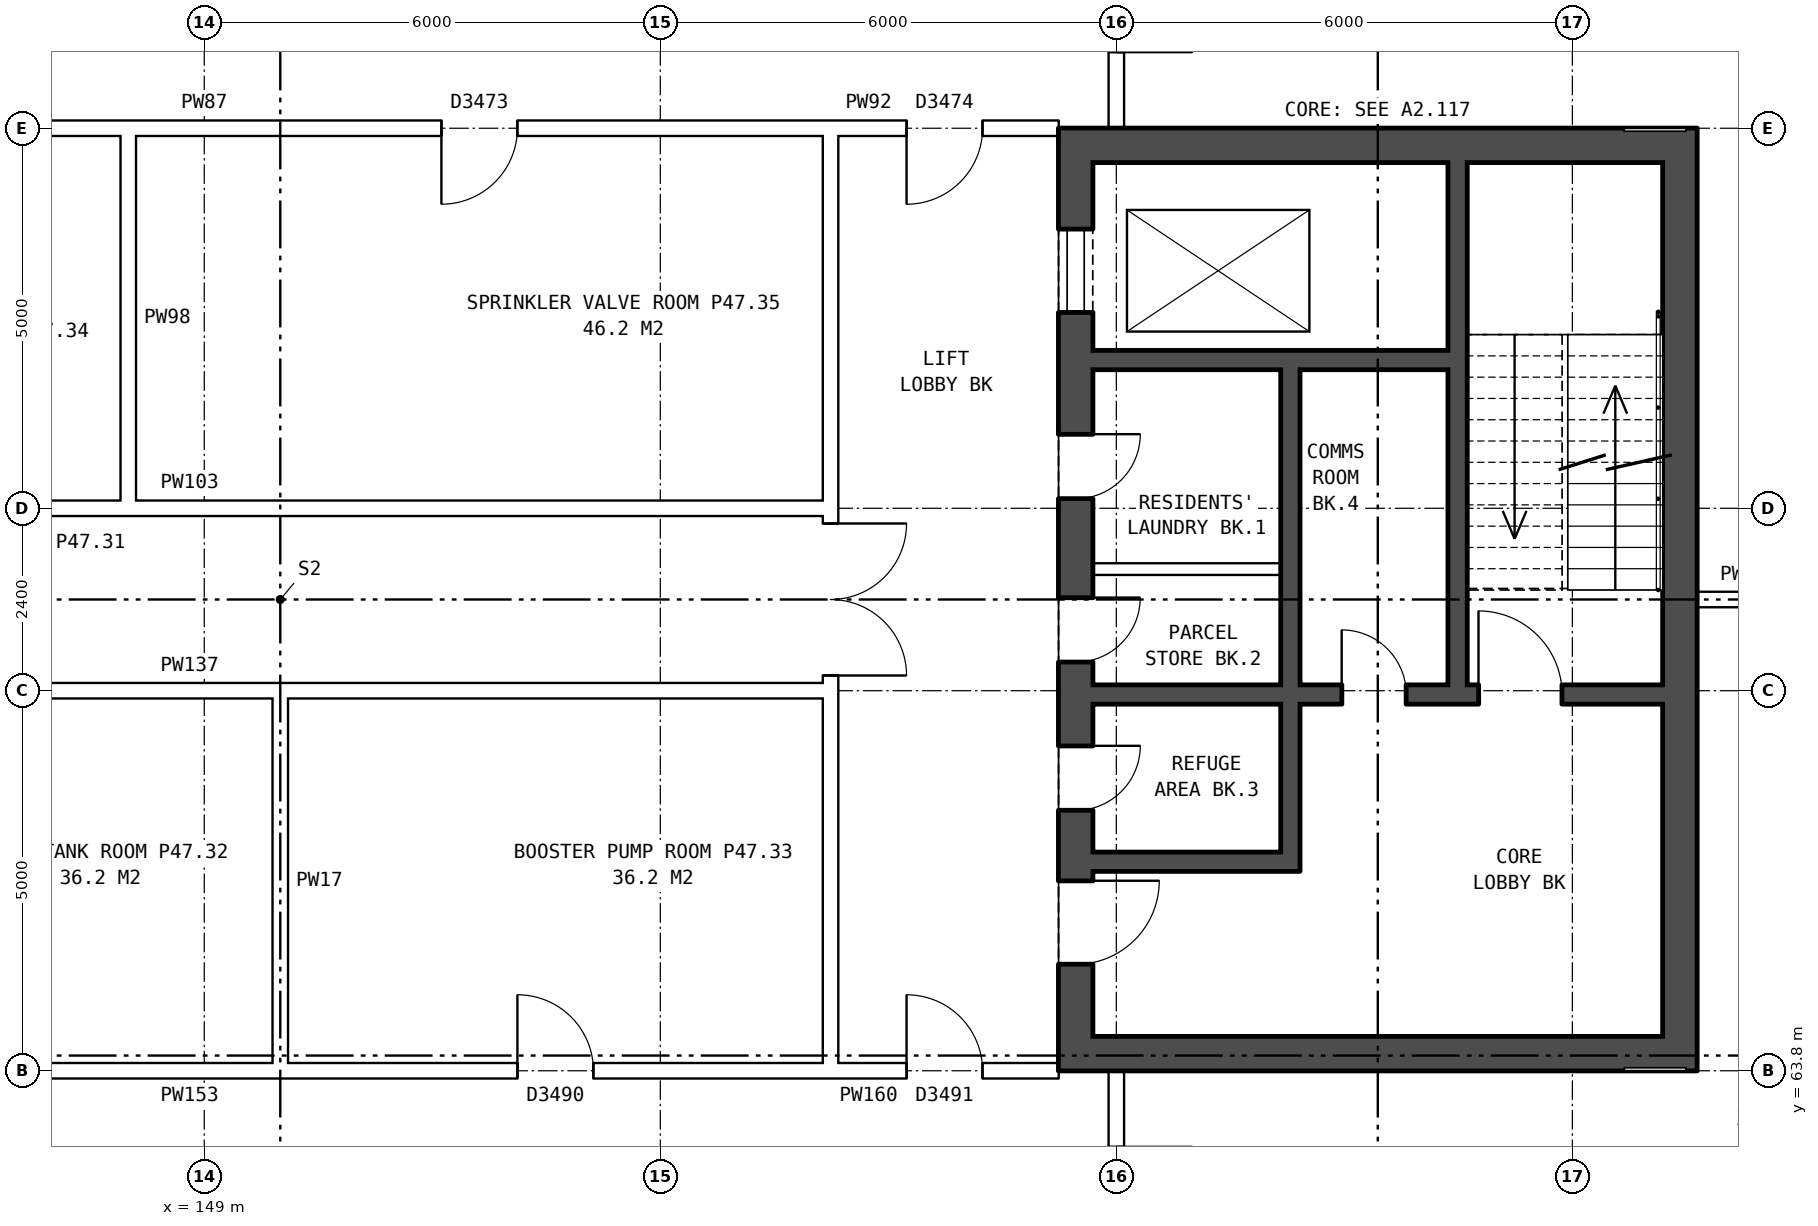
"""IFC4 building model, lengths in metres.
Left out: names, types, materials, properties, quantities, classifications, styles, units other than length and angle.
Written with IfcOpenShell. Run it as: python <this file> out.ifc"""

import sys

from ifc_helpers import new_model, si_unit, direction, frame, frame_2d, origin, place, context, subcontext, project, spatial, rectangle, extrude, element, fill, save


model = new_model("IFC4")
c1 = context("Model", 3, precision=1e-05, world=origin(), true_north=direction((0.0, 1.0)))
c2 = subcontext(c1, "Body", "Model", "MODEL_VIEW")
j1 = project(units=[si_unit("LENGTHUNIT", "METRE"), si_unit("PLANEANGLEUNIT", "RADIAN")], contexts=[c1])
p1 = place(None, origin())
s1 = spatial("IfcSite", under=j1, at=p1, CompositionType="ELEMENT")
p2 = place(p1, origin())
s2 = spatial("IfcBuilding", under=s1, at=p2, CompositionType="ELEMENT")
p3 = place(p2, frame((0.0, 0.0, 167.1)))
s3 = spatial("IfcBuildingStorey", under=s2, at=p3, CompositionType="ELEMENT", Elevation=167.1)
p4 = place(p3, frame((160.465, 76.2, 0.0), z_axis=(0.0, 0.0, 1.0), x_axis=(0.0, -1.0, 0.0)))
e1 = element("IfcWall", 1, at=p4, inside=s3, PredefinedType="SHEAR", context=c2, shape_type="SweptSolid", body=[
    extrude(rectangle(XDim=12.4, YDim=0.45, at=frame_2d((6.2, 0.0))), origin(), (0.0, 0.0, 1.0), 4.2),
])
p5 = place(p4, frame((1.325, 0.0, 0.0)))
e2 = element("IfcOpeningElement", 2, at=p5, cuts=e1, PredefinedType="OPENING", context=c2, shape_type="SweptSolid", body=[
    extrude(rectangle(XDim=1.1, YDim=2.1, at=frame_2d((0.55, 1.05))), frame((0.0, 0.235, 0.0), z_axis=(0.0, -1.0, 0.0), x_axis=(1.0, 0.0, 0.0)), (0.0, 0.0, 1.0), 0.47),
])
p6 = place(p4, frame((4.025, 0.0, 0.0)))
e3 = element("IfcOpeningElement", 3, at=p6, cuts=e1, PredefinedType="OPENING", context=c2, shape_type="SweptSolid", body=[
    extrude(rectangle(XDim=0.85, YDim=2.1, at=frame_2d((0.425, 1.05))), frame((0.0, 0.235, 0.0), z_axis=(0.0, -1.0, 0.0), x_axis=(1.0, 0.0, 0.0)), (0.0, 0.0, 1.0), 0.47),
])
p7 = place(p4, frame((6.175, 0.0, 0.0)))
e4 = element("IfcOpeningElement", 4, at=p7, cuts=e1, PredefinedType="OPENING", context=c2, shape_type="SweptSolid", body=[
    extrude(rectangle(XDim=0.85, YDim=2.1, at=frame_2d((0.425, 1.05))), frame((0.0, 0.235, 0.0), z_axis=(0.0, -1.0, 0.0), x_axis=(1.0, 0.0, 0.0)), (0.0, 0.0, 1.0), 0.47),
])
p8 = place(p4, frame((9.9, 0.0, 0.0)))
e5 = element("IfcOpeningElement", 5, at=p8, cuts=e1, PredefinedType="OPENING", context=c2, shape_type="SweptSolid", body=[
    extrude(rectangle(XDim=1.1, YDim=2.1, at=frame_2d((0.55, 1.05))), frame((0.0, 0.235, 0.0), z_axis=(0.0, -1.0, 0.0), x_axis=(1.0, 0.0, 0.0)), (0.0, 0.0, 1.0), 0.47),
])
p9 = place(p4, frame((8.125, 0.0, 0.0)))
e6 = element("IfcOpeningElement", 6, at=p9, cuts=e1, PredefinedType="OPENING", context=c2, shape_type="SweptSolid", body=[
    extrude(rectangle(XDim=0.85, YDim=2.1, at=frame_2d((0.425, 1.05))), frame((0.0, 0.235, 0.0), z_axis=(0.0, -1.0, 0.0), x_axis=(1.0, 0.0, 0.0)), (0.0, 0.0, 1.0), 0.47),
])
p10 = place(p3, frame((168.415, 76.2, 0.0), z_axis=(0.0, 0.0, 1.0), x_axis=(0.0, -1.0, 0.0)))
e7 = element("IfcWall", 7, at=p10, inside=s3, PredefinedType="SHEAR", context=c2, shape_type="SweptSolid", body=[
    extrude(rectangle(XDim=12.4, YDim=0.45, at=frame_2d((6.2, 0.0))), origin(), (0.0, 0.0, 1.0), 4.2),
])
for number, where, z_axis, x_axis in (
    (8, (160.69, 75.975, 0.0), (0.0, 0.0, 1.0), (1.0, 0.0, 0.0)),
    (9, (160.69, 64.025, 0.0), (0.0, 0.0, 1.0), (1.0, 0.0, 0.0)),
):
    element("IfcWall", number, at=place(p3, frame(where, z_axis=z_axis, x_axis=x_axis)), inside=s3, PredefinedType="SHEAR", context=c2, shape_type="SweptSolid", body=[
        extrude(rectangle(XDim=7.5, YDim=0.45, at=frame_2d((3.75, 0.0))), origin(), (0.0, 0.0, 1.0), 4.2),
    ])
p11 = place(p3, frame((160.69, 73.15, 0.0), z_axis=(0.0, 0.0, 1.0), x_axis=(1.0, 0.0, 0.0)))
e10 = element("IfcWall", 10, at=p11, inside=s3, PredefinedType="SHEAR", context=c2, shape_type="SweptSolid", body=[
    extrude(rectangle(XDim=4.675, YDim=0.25, at=frame_2d((2.337, 0.0))), origin(), (0.0, 0.0, 1.0), 4.2),
])
p12 = place(p3, frame((160.69, 70.4, 0.0), z_axis=(0.0, 0.0, 1.0), x_axis=(1.0, 0.0, 0.0)))
e11 = element("IfcWall", 11, at=p12, inside=s3, PredefinedType="PARTITIONING", context=c2, shape_type="SweptSolid", body=[
    extrude(rectangle(XDim=2.475, YDim=0.15, at=frame_2d((1.238, 0.0))), origin(), (0.0, 0.0, 1.0), 4.2),
])
p13 = place(p3, frame((160.69, 68.75, 0.0), z_axis=(0.0, 0.0, 1.0), x_axis=(1.0, 0.0, 0.0)))
e12 = element("IfcWall", 12, at=p13, inside=s3, PredefinedType="SHEAR", context=c2, shape_type="SweptSolid", body=[
    extrude(rectangle(XDim=7.5, YDim=0.25, at=frame_2d((3.75, 0.0))), origin(), (0.0, 0.0, 1.0), 4.2),
])
p14 = place(p13, frame((5.075, 0.0, 0.0)))
e13 = element("IfcOpeningElement", 13, at=p14, cuts=e12, PredefinedType="OPENING", context=c2, shape_type="SweptSolid", body=[
    extrude(rectangle(XDim=1.1, YDim=2.1, at=frame_2d((0.55, 1.05))), frame((0.0, 0.135, 0.0), z_axis=(0.0, -1.0, 0.0), x_axis=(1.0, 0.0, 0.0)), (0.0, 0.0, 1.0), 0.27),
])
p15 = place(p13, frame((3.275, 0.0, 0.0)))
e14 = element("IfcOpeningElement", 14, at=p15, cuts=e12, PredefinedType="OPENING", context=c2, shape_type="SweptSolid", body=[
    extrude(rectangle(XDim=0.85, YDim=2.1, at=frame_2d((0.425, 1.05))), frame((0.0, 0.135, 0.0), z_axis=(0.0, -1.0, 0.0), x_axis=(1.0, 0.0, 0.0)), (0.0, 0.0, 1.0), 0.27),
])
p16 = place(p3, frame((160.69, 66.55, 0.0), z_axis=(0.0, 0.0, 1.0), x_axis=(1.0, 0.0, 0.0)))
e15 = element("IfcWall", 15, at=p16, inside=s3, PredefinedType="SHEAR", context=c2, shape_type="SweptSolid", body=[
    extrude(rectangle(XDim=2.475, YDim=0.25, at=frame_2d((1.238, 0.0))), origin(), (0.0, 0.0, 1.0), 4.2),
])
p17 = place(p3, frame((163.29, 73.025, 0.0), z_axis=(0.0, 0.0, 1.0), x_axis=(0.0, -1.0, 0.0)))
e16 = element("IfcWall", 16, at=p17, inside=s3, PredefinedType="SHEAR", context=c2, shape_type="SweptSolid", body=[
    extrude(rectangle(XDim=4.15, YDim=0.25, at=frame_2d((2.075, 0.0))), origin(), (0.0, 0.0, 1.0), 4.2),
])
p18 = place(p3, frame((163.29, 68.625, 0.0), z_axis=(0.0, 0.0, 1.0), x_axis=(0.0, -1.0, 0.0)))
e17 = element("IfcWall", 17, at=p18, inside=s3, PredefinedType="SHEAR", context=c2, shape_type="SweptSolid", body=[
    extrude(rectangle(XDim=2.2, YDim=0.25, at=frame_2d((1.1, 0.0))), origin(), (0.0, 0.0, 1.0), 4.2),
])
p19 = place(p3, frame((165.49, 75.75, 0.0), z_axis=(0.0, 0.0, 1.0), x_axis=(0.0, -1.0, 0.0)))
e18 = element("IfcWall", 18, at=p19, inside=s3, PredefinedType="SHEAR", context=c2, shape_type="SweptSolid", body=[
    extrude(rectangle(XDim=6.875, YDim=0.25, at=frame_2d((3.438, 0.0))), origin(), (0.0, 0.0, 1.0), 4.2),
])
p20 = place(p3, frame((157.24, 63.9, 0.0), z_axis=(0.0, 0.0, 1.0), x_axis=(0.0, 1.0, 0.0)))
e19 = element("IfcWall", 19, at=p20, inside=s3, PredefinedType="PARTITIONING", context=c2, shape_type="SweptSolid", body=[
    extrude(rectangle(XDim=12.2, YDim=0.2, at=frame_2d((6.1, 0.0))), origin(), (0.0, 0.0, 1.0), 4.2),
])
p21 = place(p20, frame((5.1, 0.0, 0.0)))
e20 = element("IfcOpeningElement", 20, at=p21, cuts=e19, PredefinedType="OPENING", context=c2, shape_type="SweptSolid", body=[
    extrude(rectangle(XDim=2.0, YDim=2.1, at=frame_2d((1.0, 1.05))), frame((0.0, 0.11, 0.0), z_axis=(0.0, -1.0, 0.0), x_axis=(1.0, 0.0, 0.0)), (0.0, 0.0, 1.0), 0.22),
])
p22 = place(p3, frame((142.76, 63.8, 0.0), z_axis=(0.0, 0.0, 1.0), x_axis=(1.0, 0.0, 0.0)))
e21 = element("IfcWall", 21, at=p22, inside=s3, PredefinedType="PARTITIONING", context=c2, shape_type="SweptSolid", body=[
    extrude(rectangle(XDim=14.48, YDim=0.2, at=frame_2d((7.24, 0.0))), origin(), (0.0, 0.0, 1.0), 4.2),
])
p23 = place(p22, frame((3.12, 0.0, 0.0)))
e22 = element("IfcOpeningElement", 22, at=p23, cuts=e21, PredefinedType="OPENING", context=c2, shape_type="SweptSolid", body=[
    extrude(rectangle(XDim=1.0, YDim=2.1, at=frame_2d((0.5, 1.05))), frame((0.0, 0.11, 0.0), z_axis=(0.0, -1.0, 0.0), x_axis=(1.0, 0.0, 0.0)), (0.0, 0.0, 1.0), 0.22),
])
p24 = place(p22, frame((10.36, 0.0, 0.0)))
e23 = element("IfcOpeningElement", 23, at=p24, cuts=e21, PredefinedType="OPENING", context=c2, shape_type="SweptSolid", body=[
    extrude(rectangle(XDim=1.0, YDim=2.1, at=frame_2d((0.5, 1.05))), frame((0.0, 0.11, 0.0), z_axis=(0.0, -1.0, 0.0), x_axis=(1.0, 0.0, 0.0)), (0.0, 0.0, 1.0), 0.22),
])
p25 = place(p3, frame((157.24, 63.8, 0.0), z_axis=(0.0, 0.0, 1.0), x_axis=(1.0, 0.0, 0.0)))
e24 = element("IfcWall", 24, at=p25, inside=s3, PredefinedType="PARTITIONING", context=c2, shape_type="SweptSolid", body=[
    extrude(rectangle(XDim=3.0, YDim=0.2, at=frame_2d((1.5, 0.0))), origin(), (0.0, 0.0, 1.0), 4.2),
])
p26 = place(p25, frame((1.0, 0.0, 0.0)))
e25 = element("IfcOpeningElement", 25, at=p26, cuts=e24, PredefinedType="OPENING", context=c2, shape_type="SweptSolid", body=[
    extrude(rectangle(XDim=1.0, YDim=2.1, at=frame_2d((0.5, 1.05))), frame((0.0, 0.11, 0.0), z_axis=(0.0, -1.0, 0.0), x_axis=(1.0, 0.0, 0.0)), (0.0, 0.0, 1.0), 0.22),
])
p27 = place(p3, frame((142.76, 68.8, 0.0), z_axis=(0.0, 0.0, 1.0), x_axis=(1.0, 0.0, 0.0)))
e26 = element("IfcWall", 26, at=p27, inside=s3, PredefinedType="PARTITIONING", context=c2, shape_type="SweptSolid", body=[
    extrude(rectangle(XDim=14.48, YDim=0.2, at=frame_2d((7.24, 0.0))), origin(), (0.0, 0.0, 1.0), 4.2),
])
p28 = place(p3, frame((168.64, 70.0, 0.0), z_axis=(0.0, 0.0, 1.0), x_axis=(1.0, 0.0, 0.0)))
e27 = element("IfcWall", 27, at=p28, inside=s3, PredefinedType="PARTITIONING", context=c2, shape_type="SweptSolid", body=[
    extrude(rectangle(XDim=1.37, YDim=0.2, at=frame_2d((0.685, 0.0))), origin(), (0.0, 0.0, 1.0), 4.2),
])
p29 = place(p3, frame((142.76, 71.2, 0.0), z_axis=(0.0, 0.0, 1.0), x_axis=(1.0, 0.0, 0.0)))
e28 = element("IfcWall", 28, at=p29, inside=s3, PredefinedType="PARTITIONING", context=c2, shape_type="SweptSolid", body=[
    extrude(rectangle(XDim=14.48, YDim=0.2, at=frame_2d((7.24, 0.0))), origin(), (0.0, 0.0, 1.0), 4.2),
])
p30 = place(p3, frame((142.76, 76.2, 0.0), z_axis=(0.0, 0.0, 1.0), x_axis=(1.0, 0.0, 0.0)))
e29 = element("IfcWall", 29, at=p30, inside=s3, PredefinedType="PARTITIONING", context=c2, shape_type="SweptSolid", body=[
    extrude(rectangle(XDim=14.48, YDim=0.2, at=frame_2d((7.24, 0.0))), origin(), (0.0, 0.0, 1.0), 4.2),
])
p31 = place(p30, frame((2.12, 0.0, 0.0)))
e30 = element("IfcOpeningElement", 30, at=p31, cuts=e29, PredefinedType="OPENING", context=c2, shape_type="SweptSolid", body=[
    extrude(rectangle(XDim=1.0, YDim=2.1, at=frame_2d((0.5, 1.05))), frame((0.0, 0.11, 0.0), z_axis=(0.0, -1.0, 0.0), x_axis=(1.0, 0.0, 0.0)), (0.0, 0.0, 1.0), 0.22),
])
p32 = place(p30, frame((9.36, 0.0, 0.0)))
e31 = element("IfcOpeningElement", 31, at=p32, cuts=e29, PredefinedType="OPENING", context=c2, shape_type="SweptSolid", body=[
    extrude(rectangle(XDim=1.0, YDim=2.1, at=frame_2d((0.5, 1.05))), frame((0.0, 0.11, 0.0), z_axis=(0.0, -1.0, 0.0), x_axis=(1.0, 0.0, 0.0)), (0.0, 0.0, 1.0), 0.22),
])
p33 = place(p3, frame((157.24, 76.2, 0.0), z_axis=(0.0, 0.0, 1.0), x_axis=(1.0, 0.0, 0.0)))
e32 = element("IfcWall", 32, at=p33, inside=s3, PredefinedType="PARTITIONING", context=c2, shape_type="SweptSolid", body=[
    extrude(rectangle(XDim=3.0, YDim=0.2, at=frame_2d((1.5, 0.0))), origin(), (0.0, 0.0, 1.0), 4.2),
])
p34 = place(p33, frame((1.0, 0.0, 0.0)))
e33 = element("IfcOpeningElement", 33, at=p34, cuts=e32, PredefinedType="OPENING", context=c2, shape_type="SweptSolid", body=[
    extrude(rectangle(XDim=1.0, YDim=2.1, at=frame_2d((0.5, 1.05))), frame((0.0, 0.11, 0.0), z_axis=(0.0, -1.0, 0.0), x_axis=(1.0, 0.0, 0.0)), (0.0, 0.0, 1.0), 0.22),
])
for number, where, z_axis, x_axis in (
    (34, (148.0, 71.1, 0.0), (0.0, 0.0, 1.0), (0.0, 1.0, 0.0)),
    (35, (150.0, 63.7, 0.0), (0.0, 0.0, 1.0), (0.0, 1.0, 0.0)),
):
    element("IfcWall", number, at=place(p3, frame(where, z_axis=z_axis, x_axis=x_axis)), inside=s3, PredefinedType="PARTITIONING", context=c2, shape_type="SweptSolid", body=[
        extrude(rectangle(XDim=5.2, YDim=0.2, at=frame_2d((2.6, 0.0))), origin(), (0.0, 0.0, 1.0), 4.2),
    ])
p35 = place(p3, frame((161.0, 54.24, 0.0), z_axis=(0.0, 0.0, 1.0), x_axis=(0.0, 1.0, 0.0)))
e36 = element("IfcWall", 36, at=p35, inside=s3, PredefinedType="PARTITIONING", context=c2, shape_type="SweptSolid", body=[
    extrude(rectangle(XDim=9.56, YDim=0.2, at=frame_2d((4.78, 0.0))), origin(), (0.0, 0.0, 1.0), 4.2),
])
p36 = place(p35, frame((7.559, 0.0, 0.0)))
e37 = element("IfcOpeningElement", 37, at=p36, cuts=e36, PredefinedType="OPENING", context=c2, shape_type="SweptSolid", body=[
    extrude(rectangle(XDim=1.0, YDim=2.1, at=frame_2d((0.5, 1.05))), frame((0.0, 0.11, 0.0), z_axis=(0.0, -1.0, 0.0), x_axis=(1.0, 0.0, 0.0)), (0.0, 0.0, 1.0), 0.22),
])
p37 = place(p3, frame((161.0, 76.2, 0.0), z_axis=(0.0, 0.0, 1.0), x_axis=(0.0, 1.0, 0.0)))
e38 = element("IfcWall", 38, at=p37, inside=s3, PredefinedType="PARTITIONING", context=c2, shape_type="SweptSolid", body=[
    extrude(rectangle(XDim=9.56, YDim=0.2, at=frame_2d((4.78, 0.0))), origin(), (0.0, 0.0, 1.0), 4.2),
])
p38 = place(p37, frame((1.001, 0.0, 0.0)))
e39 = element("IfcOpeningElement", 39, at=p38, cuts=e38, PredefinedType="OPENING", context=c2, shape_type="SweptSolid", body=[
    extrude(rectangle(XDim=1.0, YDim=2.1, at=frame_2d((0.5, 1.05))), frame((0.0, 0.11, 0.0), z_axis=(0.0, -1.0, 0.0), x_axis=(1.0, 0.0, 0.0)), (0.0, 0.0, 1.0), 0.22),
])
p39 = place(p5, origin())
e40 = element("IfcDoor", 40, at=p39, inside=s3, OperationType="DOUBLE_DOOR_SLIDING", PredefinedType="DOOR", context=c2, shape_type="SweptSolid", body=[
    extrude(rectangle(XDim=1.1, YDim=2.1, at=frame_2d((0.55, 1.05))), frame((0.0, 0.21, 0.0), z_axis=(0.0, -1.0, 0.0), x_axis=(1.0, 0.0, 0.0)), (0.0, 0.0, 1.0), 0.05),
])
fill(e2, e40)
p40 = place(p6, origin())
e41 = element("IfcDoor", 41, at=p40, inside=s3, OperationType="SINGLE_SWING_LEFT", PredefinedType="DOOR", context=c2, shape_type="SweptSolid", body=[
    extrude(rectangle(XDim=0.85, YDim=2.1, at=frame_2d((0.425, 1.05))), frame((0.0, 0.21, 0.0), z_axis=(0.0, -1.0, 0.0), x_axis=(1.0, 0.0, 0.0)), (0.0, 0.0, 1.0), 0.05),
])
fill(e3, e41)
p41 = place(p7, origin())
e42 = element("IfcDoor", 42, at=p41, inside=s3, OperationType="SINGLE_SWING_LEFT", PredefinedType="DOOR", context=c2, shape_type="SweptSolid", body=[
    extrude(rectangle(XDim=0.85, YDim=2.1, at=frame_2d((0.425, 1.05))), frame((0.0, 0.21, 0.0), z_axis=(0.0, -1.0, 0.0), x_axis=(1.0, 0.0, 0.0)), (0.0, 0.0, 1.0), 0.05),
])
fill(e4, e42)
p42 = place(p8, origin())
e43 = element("IfcDoor", 43, at=p42, inside=s3, OperationType="SINGLE_SWING_LEFT", PredefinedType="DOOR", context=c2, shape_type="SweptSolid", body=[
    extrude(rectangle(XDim=1.1, YDim=2.1, at=frame_2d((0.55, 1.05))), frame((0.0, 0.21, 0.0), z_axis=(0.0, -1.0, 0.0), x_axis=(1.0, 0.0, 0.0)), (0.0, 0.0, 1.0), 0.05),
])
fill(e5, e43)
p43 = place(p14, origin())
e44 = element("IfcDoor", 44, at=p43, inside=s3, OperationType="SINGLE_SWING_LEFT", PredefinedType="DOOR", context=c2, shape_type="SweptSolid", body=[
    extrude(rectangle(XDim=1.1, YDim=2.1, at=frame_2d((0.55, 1.05))), frame((0.0, 0.025, 0.0), z_axis=(0.0, -1.0, 0.0), x_axis=(1.0, 0.0, 0.0)), (0.0, 0.0, 1.0), 0.05),
])
fill(e13, e44)
p44 = place(p9, origin())
e45 = element("IfcDoor", 45, at=p44, inside=s3, OperationType="SINGLE_SWING_LEFT", PredefinedType="DOOR", context=c2, shape_type="SweptSolid", body=[
    extrude(rectangle(XDim=0.85, YDim=2.1, at=frame_2d((0.425, 1.05))), frame((0.0, 0.21, 0.0), z_axis=(0.0, -1.0, 0.0), x_axis=(1.0, 0.0, 0.0)), (0.0, 0.0, 1.0), 0.05),
])
fill(e6, e45)
p45 = place(p15, origin())
e46 = element("IfcDoor", 46, at=p45, inside=s3, OperationType="SINGLE_SWING_LEFT", PredefinedType="DOOR", context=c2, shape_type="SweptSolid", body=[
    extrude(rectangle(XDim=0.85, YDim=2.1, at=frame_2d((0.425, 1.05))), frame((0.0, 0.025, 0.0), z_axis=(0.0, -1.0, 0.0), x_axis=(1.0, 0.0, 0.0)), (0.0, 0.0, 1.0), 0.05),
])
fill(e14, e46)
p46 = place(p21, frame((2.0, 0.0, 0.0), z_axis=(0.0, 0.0, 1.0), x_axis=(-1.0, 0.0, 0.0)))
e47 = element("IfcDoor", 47, at=p46, inside=s3, OperationType="DOUBLE_DOOR_SINGLE_SWING", PredefinedType="DOOR", context=c2, shape_type="SweptSolid", body=[
    extrude(rectangle(XDim=2.0, YDim=2.1, at=frame_2d((1.0, 1.05))), frame((0.0, 0.025, 0.0), z_axis=(0.0, -1.0, 0.0), x_axis=(1.0, 0.0, 0.0)), (0.0, 0.0, 1.0), 0.05),
])
fill(e20, e47)
p47 = place(p24, origin())
e48 = element("IfcDoor", 48, at=p47, inside=s3, OperationType="SINGLE_SWING_LEFT", PredefinedType="DOOR", context=c2, shape_type="SweptSolid", body=[
    extrude(rectangle(XDim=1.0, YDim=2.1, at=frame_2d((0.5, 1.05))), frame((0.0, 0.025, 0.0), z_axis=(0.0, -1.0, 0.0), x_axis=(1.0, 0.0, 0.0)), (0.0, 0.0, 1.0), 0.05),
])
fill(e23, e48)
p48 = place(p26, origin())
e49 = element("IfcDoor", 49, at=p48, inside=s3, OperationType="SINGLE_SWING_LEFT", PredefinedType="DOOR", context=c2, shape_type="SweptSolid", body=[
    extrude(rectangle(XDim=1.0, YDim=2.1, at=frame_2d((0.5, 1.05))), frame((0.0, 0.025, 0.0), z_axis=(0.0, -1.0, 0.0), x_axis=(1.0, 0.0, 0.0)), (0.0, 0.0, 1.0), 0.05),
])
fill(e25, e49)
p49 = place(p32, frame((1.0, 0.0, 0.0), z_axis=(0.0, 0.0, 1.0), x_axis=(-1.0, 0.0, 0.0)))
e50 = element("IfcDoor", 50, at=p49, inside=s3, OperationType="SINGLE_SWING_RIGHT", PredefinedType="DOOR", context=c2, shape_type="SweptSolid", body=[
    extrude(rectangle(XDim=1.0, YDim=2.1, at=frame_2d((0.5, 1.05))), frame((0.0, 0.025, 0.0), z_axis=(0.0, -1.0, 0.0), x_axis=(1.0, 0.0, 0.0)), (0.0, 0.0, 1.0), 0.05),
])
fill(e31, e50)
p50 = place(p34, frame((1.0, 0.0, 0.0), z_axis=(0.0, 0.0, 1.0), x_axis=(-1.0, 0.0, 0.0)))
e51 = element("IfcDoor", 51, at=p50, inside=s3, OperationType="SINGLE_SWING_RIGHT", PredefinedType="DOOR", context=c2, shape_type="SweptSolid", body=[
    extrude(rectangle(XDim=1.0, YDim=2.1, at=frame_2d((0.5, 1.05))), frame((0.0, 0.025, 0.0), z_axis=(0.0, -1.0, 0.0), x_axis=(1.0, 0.0, 0.0)), (0.0, 0.0, 1.0), 0.05),
])
fill(e33, e51)
save(model, sys.argv[1])
